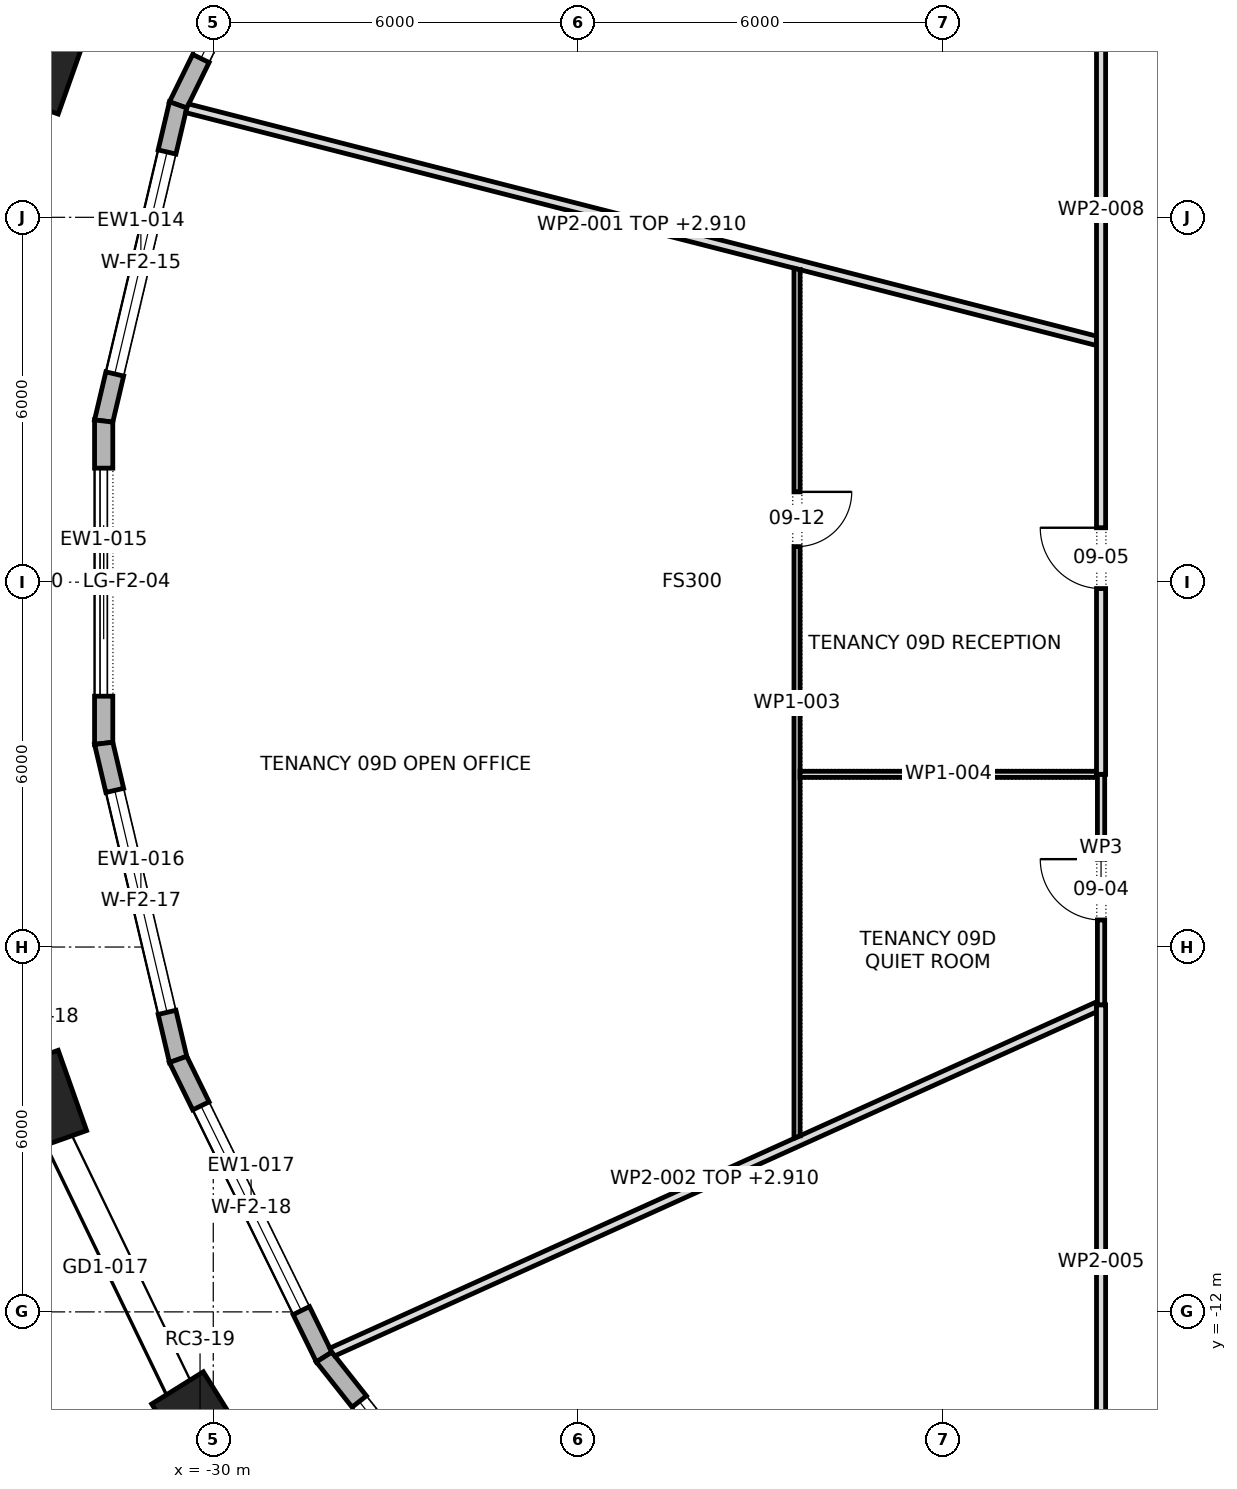
"""IFC4 building model, lengths in metres.
Left out: names, types, materials, properties, quantities, classifications, styles, units other than length and angle.
Written with IfcOpenShell. Run it as: python <this file> out.ifc"""

import sys

from ifc_helpers import new_model, si_unit, direction, frame, frame_2d, origin, origin_2d, place, context, subcontext, project, spatial, polyline, rectangle, outline, extrude, element, fill, save


model = new_model("IFC4")
c1 = context("Model", 3, precision=1e-05, world=origin(), true_north=direction((0.0, 1.0)))
c2 = subcontext(c1, "Body", "Model", "MODEL_VIEW")
j1 = project(units=[si_unit("LENGTHUNIT", "METRE"), si_unit("PLANEANGLEUNIT", "RADIAN")], contexts=[c1])
p1 = place(None, origin())
s1 = spatial("IfcSite", under=j1, at=p1, CompositionType="ELEMENT")
p2 = place(p1, origin())
s2 = spatial("IfcBuilding", under=s1, at=p2, CompositionType="ELEMENT")
p3 = place(p2, frame((0.0, 0.0, 138.1)))
s3 = spatial("IfcBuildingStorey", under=s2, at=p3, CompositionType="ELEMENT", Elevation=138.1)
for number, where, z_axis, x_axis in (
    (1, (-32.788, 8.525, 0.0), (0.0, 0.0, 1.0), (-0.334, -0.943, 0.0)),
    (2, (-32.788, -8.525, 0.0), (0.0, 0.0, 1.0), (0.334, -0.943, 0.0)),
    (3, (-30.217, -13.844, 0.0), (0.0, 0.0, 1.0), (0.529, -0.849, 0.0)),
):
    element("IfcColumn", number, at=place(p3, frame(where, z_axis=z_axis, x_axis=x_axis)), inside=s3, PredefinedType="COLUMN", context=c2, shape_type="SweptSolid", body=[
        extrude(rectangle(XDim=1.4, YDim=1.0, at=origin_2d()), origin(), (0.0, 0.0, 1.0), 4.2),
    ])
p4 = place(p3, frame((-28.177, 12.743, 0.0), z_axis=(0.0, 0.0, 1.0), x_axis=(-0.440321465864, -0.897840189956, 0.0)))
e4 = element("IfcWall", 4, at=p4, inside=s3, PredefinedType="STANDARD", context=c2, shape_type="SweptSolid", body=[
    extrude(outline(polyline([(-0.016, -0.15), (5.468, -0.15), (5.435, 0.15), (0.016, 0.15), (-0.016, -0.15)])), origin(), (0.0, 0.0, 1.0), 3.9),
])
p5 = place(p4, frame((0.851, 0.0, 0.6)))
e5 = element("IfcOpeningElement", 5, at=p5, cuts=e4, PredefinedType="OPENING", context=c2, shape_type="SweptSolid", body=[
    extrude(rectangle(XDim=3.75, YDim=2.85, at=frame_2d((1.875, 1.425))), frame((0.0, 0.162, 0.0), z_axis=(0.0, -1.0, 0.0), x_axis=(1.0, 0.0, 0.0)), (0.0, 0.0, 1.0), 0.324),
])
p6 = place(p3, frame((-30.578, 7.848, 0.0), z_axis=(0.0, 0.0, 1.0), x_axis=(-0.229227895667, -0.973372781543, 0.0)))
e6 = element("IfcWall", 6, at=p6, inside=s3, PredefinedType="STANDARD", context=c2, shape_type="SweptSolid", body=[
    extrude(outline(polyline([(-0.017, -0.15), (5.357, -0.15), (5.323, 0.15), (0.017, 0.15), (-0.017, -0.15)])), origin(), (0.0, 0.0, 1.0), 3.9),
])
p7 = place(p6, frame((0.795, 0.0, 0.6)))
e7 = element("IfcOpeningElement", 7, at=p7, cuts=e6, PredefinedType="OPENING", context=c2, shape_type="SweptSolid", body=[
    extrude(rectangle(XDim=3.75, YDim=2.85, at=frame_2d((1.875, 1.425))), frame((0.0, 0.162, 0.0), z_axis=(0.0, -1.0, 0.0), x_axis=(1.0, 0.0, 0.0)), (0.0, 0.0, 1.0), 0.324),
])
p8 = place(p3, frame((-31.802, 2.65, 0.0), z_axis=(0.0, 0.0, 1.0), x_axis=(0.0, -1.0, 0.0)))
e8 = element("IfcWall", 8, at=p8, inside=s3, PredefinedType="STANDARD", context=c2, shape_type="SweptSolid", body=[
    extrude(outline(polyline([(-0.017, -0.15), (5.318, -0.15), (5.283, 0.15), (0.017, 0.15), (-0.017, -0.15)])), origin(), (0.0, 0.0, 1.0), 3.9),
])
p9 = place(p8, frame((0.775, 0.0, 0.0)))
e9 = element("IfcOpeningElement", 9, at=p9, cuts=e8, PredefinedType="OPENING", context=c2, shape_type="SweptSolid", body=[
    extrude(rectangle(XDim=3.75, YDim=3.45, at=frame_2d((1.875, 1.725))), frame((0.0, 0.162, 0.0), z_axis=(0.0, -1.0, 0.0), x_axis=(1.0, 0.0, 0.0)), (0.0, 0.0, 1.0), 0.324),
])
p10 = place(p3, frame((-31.802, -2.65, 0.0), z_axis=(0.0, 0.0, 1.0), x_axis=(0.229227895667, -0.973372781543, 0.0)))
e10 = element("IfcWall", 10, at=p10, inside=s3, PredefinedType="STANDARD", context=c2, shape_type="SweptSolid", body=[
    extrude(outline(polyline([(-0.017, -0.15), (5.357, -0.15), (5.323, 0.15), (0.017, 0.15), (-0.017, -0.15)])), origin(), (0.0, 0.0, 1.0), 3.9),
])
p11 = place(p10, frame((0.795, 0.0, 0.6)))
e11 = element("IfcOpeningElement", 11, at=p11, cuts=e10, PredefinedType="OPENING", context=c2, shape_type="SweptSolid", body=[
    extrude(rectangle(XDim=3.75, YDim=2.85, at=frame_2d((1.875, 1.425))), frame((0.0, 0.162, 0.0), z_axis=(0.0, -1.0, 0.0), x_axis=(1.0, 0.0, 0.0)), (0.0, 0.0, 1.0), 0.324),
])
p12 = place(p3, frame((-30.578, -7.848, 0.0), z_axis=(0.0, 0.0, 1.0), x_axis=(0.440321465864, -0.897840189956, 0.0)))
e12 = element("IfcWall", 12, at=p12, inside=s3, PredefinedType="STANDARD", context=c2, shape_type="SweptSolid", body=[
    extrude(outline(polyline([(-0.017, -0.15), (5.468, -0.15), (5.435, 0.15), (0.017, 0.15), (-0.017, -0.15)])), origin(), (0.0, 0.0, 1.0), 3.9),
])
p13 = place(p12, frame((0.851, 0.0, 0.6)))
e13 = element("IfcOpeningElement", 13, at=p13, cuts=e12, PredefinedType="OPENING", context=c2, shape_type="SweptSolid", body=[
    extrude(rectangle(XDim=3.75, YDim=2.85, at=frame_2d((1.875, 1.425))), frame((0.0, 0.162, 0.0), z_axis=(0.0, -1.0, 0.0), x_axis=(1.0, 0.0, 0.0)), (0.0, 0.0, 1.0), 0.324),
])
p14 = place(p3, frame((-28.177, -12.743, 0.0), z_axis=(0.0, 0.0, 1.0), x_axis=(0.620464552431, -0.784234492468, 0.0)))
e14 = element("IfcWall", 14, at=p14, inside=s3, PredefinedType="STANDARD", context=c2, shape_type="SweptSolid", body=[
    extrude(outline(polyline([(-0.016, -0.15), (5.629, -0.15), (5.599, 0.15), (0.016, 0.15), (-0.016, -0.15)])), origin(), (0.0, 0.0, 1.0), 3.9),
])
p15 = place(p14, frame((0.932, 0.0, 0.6)))
e15 = element("IfcOpeningElement", 15, at=p15, cuts=e14, PredefinedType="OPENING", context=c2, shape_type="SweptSolid", body=[
    extrude(rectangle(XDim=3.75, YDim=2.85, at=frame_2d((1.875, 1.425))), frame((0.0, 0.162, 0.0), z_axis=(0.0, -1.0, 0.0), x_axis=(1.0, 0.0, 0.0)), (0.0, 0.0, 1.0), 0.324),
])
p16 = place(p3, frame((-30.435, 7.795, 0.0), z_axis=(0.0, 0.0, 1.0), x_axis=(0.968826155352, -0.247741560312, 0.0)))
e16 = element("IfcWall", 16, at=p16, inside=s3, PredefinedType="PARTITIONING", context=c2, shape_type="SweptSolid", body=[
    extrude(outline(polyline([(0.0, -0.075), (1.737, -0.075), (3.474, -0.075), (5.211, -0.075), (6.948, -0.075), (8.685, -0.075), (10.422, -0.075), (10.428, -0.073), (10.428, -0.075), (12.106, -0.075), (13.783, -0.075), (15.46, -0.075), (15.46, -0.073), (15.422, 0.075), (13.496, 0.075), (11.57, 0.075), (9.644, 0.075), (7.718, 0.075), (5.792, 0.075), (3.866, 0.075), (1.939, 0.075), (0.013, 0.075), (0.0, 0.01), (0.0, -0.075)])), origin(), (0.0, 0.0, 1.0), 2.91),
])
p17 = place(p3, frame((-28.052, -12.664, 0.0), z_axis=(0.0, 0.0, 1.0), x_axis=(0.911350334726, 0.411631591833, 0.0)))
e17 = element("IfcWall", 17, at=p17, inside=s3, PredefinedType="PARTITIONING", context=c2, shape_type="SweptSolid", body=[
    extrude(outline(polyline([(0.021, -0.075), (1.985, -0.075), (3.948, -0.075), (5.912, -0.075), (7.875, -0.075), (9.839, -0.075), (11.802, -0.075), (13.766, -0.075), (13.814, 0.031), (13.827, 0.025), (13.85, 0.074), (13.85, 0.075), (12.061, 0.075), (10.273, 0.075), (8.485, 0.075), (8.484, 0.073), (8.481, 0.075), (6.785, 0.075), (5.089, 0.075), (3.392, 0.075), (1.696, 0.075), (0.0, 0.075), (0.0, 0.074), (0.002, 0.001), (0.021, -0.075)])), origin(), (0.0, 0.0, 1.0), 2.91),
])
p18 = place(p3, frame((-20.4, -9.148, 0.0), z_axis=(0.0, 0.0, 1.0), x_axis=(0.0, 1.0, 0.0)))
e18 = element("IfcWall", 18, at=p18, inside=s3, PredefinedType="PARTITIONING", context=c2, shape_type="SweptSolid", body=[
    extrude(outline(polyline([(0.045, -0.05), (2.01, -0.05), (3.974, -0.05), (5.938, -0.05), (5.938, -0.05), (6.038, -0.05), (6.038, -0.05), (7.688, -0.05), (9.338, -0.05), (10.988, -0.05), (12.637, -0.05), (14.287, -0.05), (14.312, 0.049), (14.312, 0.05), (12.523, 0.05), (10.734, 0.05), (8.945, 0.05), (7.156, 0.05), (5.367, 0.05), (3.578, 0.05), (1.789, 0.05), (0.0, 0.05), (0.0, 0.05), (0.045, -0.05)])), origin(), (0.0, 0.0, 1.0), 3.9),
])
p19 = place(p18, frame((9.733, 0.0, 0.0)))
e19 = element("IfcOpeningElement", 19, at=p19, cuts=e18, PredefinedType="OPENING", context=c2, shape_type="SweptSolid", body=[
    extrude(rectangle(XDim=0.9, YDim=2.1, at=frame_2d((0.45, 1.05))), frame((0.0, 0.062, 0.0), z_axis=(0.0, -1.0, 0.0), x_axis=(1.0, 0.0, 0.0)), (0.0, 0.0, 1.0), 0.124),
])
p20 = place(p3, frame((-20.35, -3.16, 0.0), z_axis=(0.0, 0.0, 1.0), x_axis=(1.0, 0.0, 0.0)))
e20 = element("IfcWall", 20, at=p20, inside=s3, PredefinedType="PARTITIONING", context=c2, shape_type="SweptSolid", body=[
    extrude(outline(polyline([(4.89, -0.05), (4.89, 0.0), (4.875, 0.0), (4.875, 0.05), (3.25, 0.05), (1.625, 0.05), (0.0, 0.05), (0.0, -0.05), (1.63, -0.05), (3.26, -0.05), (4.89, -0.05)])), origin(), (0.0, 0.0, 1.0), 3.9),
])
p21 = place(p3, frame((-15.4, -15.475, 0.0), z_axis=(0.0, 0.0, 1.0), x_axis=(0.0, 1.0, 0.0)))
e21 = element("IfcWall", 21, at=p21, inside=s3, PredefinedType="PARTITIONING", context=c2, shape_type="SweptSolid", body=[
    extrude(outline(polyline([(8.525, 0.075), (6.82, 0.075), (5.115, 0.075), (3.41, 0.075), (1.705, 0.075), (0.0, 0.075), (0.15, -0.075), (1.825, -0.075), (3.5, -0.075), (5.175, -0.075), (6.85, -0.075), (8.525, -0.075), (8.525, 0.075)])), origin(), (0.0, 0.0, 1.0), 3.9),
])
p22 = place(p3, frame((-15.4, -6.95, 0.0), z_axis=(0.0, 0.0, 1.0), x_axis=(0.0, 1.0, 0.0)))
e22 = element("IfcWall", 22, at=p22, inside=s3, PredefinedType="PARTITIONING", context=c2, shape_type="SweptSolid", body=[
    extrude(rectangle(XDim=3.79, YDim=0.12, at=frame_2d((1.895, 0.0))), origin(), (0.0, 0.0, 1.0), 3.9),
])
p23 = place(p22, frame((1.395, 0.0, 0.0)))
e23 = element("IfcOpeningElement", 23, at=p23, cuts=e22, PredefinedType="OPENING", context=c2, shape_type="SweptSolid", body=[
    extrude(rectangle(XDim=1.0, YDim=2.1, at=frame_2d((0.5, 1.05))), frame((0.0, 0.072, 0.0), z_axis=(0.0, -1.0, 0.0), x_axis=(1.0, 0.0, 0.0)), (0.0, 0.0, 1.0), 0.144),
])
p24 = place(p3, frame((-15.4, -3.16, 0.0), z_axis=(0.0, 0.0, 1.0), x_axis=(0.0, 1.0, 0.0)))
e24 = element("IfcWall", 24, at=p24, inside=s3, PredefinedType="PARTITIONING", context=c2, shape_type="SweptSolid", body=[
    extrude(outline(polyline([(0.0, -0.075), (1.848, -0.075), (3.697, -0.075), (5.545, -0.075), (7.394, -0.075), (9.242, -0.075), (11.091, -0.075), (12.939, -0.075), (14.788, -0.075), (16.636, -0.075), (18.485, -0.075), (18.635, 0.075), (16.771, 0.075), (14.908, 0.075), (13.044, 0.075), (11.181, 0.075), (9.317, 0.075), (7.454, 0.075), (5.59, 0.075), (3.727, 0.075), (1.864, 0.075), (0.0, 0.075), (0.0, -0.075)])), origin(), (0.0, 0.0, 1.0), 3.9),
])
p25 = place(p24, frame((11.935, 0.0, 0.0)))
e25 = element("IfcOpeningElement", 25, at=p25, cuts=e24, PredefinedType="OPENING", context=c2, shape_type="SweptSolid", body=[
    extrude(rectangle(XDim=1.8, YDim=2.1, at=frame_2d((0.9, 1.05))), frame((0.0, 0.087, 0.0), z_axis=(0.0, -1.0, 0.0), x_axis=(1.0, 0.0, 0.0)), (0.0, 0.0, 1.0), 0.174),
])
p26 = place(p24, frame((3.055, 0.0, 0.0)))
e26 = element("IfcOpeningElement", 26, at=p26, cuts=e24, PredefinedType="OPENING", context=c2, shape_type="SweptSolid", body=[
    extrude(rectangle(XDim=1.0, YDim=2.1, at=frame_2d((0.5, 1.05))), frame((0.0, 0.087, 0.0), z_axis=(0.0, -1.0, 0.0), x_axis=(1.0, 0.0, 0.0)), (0.0, 0.0, 1.0), 0.174),
])
p27 = place(p5, origin())
e27 = element("IfcWindow", 27, at=p27, inside=s3, PartitioningType="TRIPLE_PANEL_VERTICAL", PredefinedType="WINDOW", context=c2, shape_type="SweptSolid", body=[
    extrude(rectangle(XDim=3.75, YDim=2.85, at=frame_2d((1.875, 1.425))), frame((0.0, 0.03, 0.0), z_axis=(0.0, -1.0, 0.0), x_axis=(1.0, 0.0, 0.0)), (0.0, 0.0, 1.0), 0.06),
])
fill(e5, e27)
p28 = place(p7, origin())
e28 = element("IfcWindow", 28, at=p28, inside=s3, PartitioningType="TRIPLE_PANEL_VERTICAL", PredefinedType="WINDOW", context=c2, shape_type="SweptSolid", body=[
    extrude(rectangle(XDim=3.75, YDim=2.85, at=frame_2d((1.875, 1.425))), frame((0.0, 0.03, 0.0), z_axis=(0.0, -1.0, 0.0), x_axis=(1.0, 0.0, 0.0)), (0.0, 0.0, 1.0), 0.06),
])
fill(e7, e28)
p29 = place(p9, origin())
e29 = element("IfcDoor", 29, at=p29, inside=s3, OperationType="DOUBLE_DOOR_SLIDING", PredefinedType="DOOR", context=c2, shape_type="SweptSolid", body=[
    extrude(rectangle(XDim=3.75, YDim=3.45, at=frame_2d((1.875, 1.725))), frame((0.0, 0.025, 0.0), z_axis=(0.0, -1.0, 0.0), x_axis=(1.0, 0.0, 0.0)), (0.0, 0.0, 1.0), 0.05),
])
fill(e9, e29)
p30 = place(p11, origin())
e30 = element("IfcWindow", 30, at=p30, inside=s3, PartitioningType="TRIPLE_PANEL_VERTICAL", PredefinedType="WINDOW", context=c2, shape_type="SweptSolid", body=[
    extrude(rectangle(XDim=3.75, YDim=2.85, at=frame_2d((1.875, 1.425))), frame((0.0, 0.03, 0.0), z_axis=(0.0, -1.0, 0.0), x_axis=(1.0, 0.0, 0.0)), (0.0, 0.0, 1.0), 0.06),
])
fill(e11, e30)
p31 = place(p13, origin())
e31 = element("IfcWindow", 31, at=p31, inside=s3, PartitioningType="TRIPLE_PANEL_VERTICAL", PredefinedType="WINDOW", context=c2, shape_type="SweptSolid", body=[
    extrude(rectangle(XDim=3.75, YDim=2.85, at=frame_2d((1.875, 1.425))), frame((0.0, 0.03, 0.0), z_axis=(0.0, -1.0, 0.0), x_axis=(1.0, 0.0, 0.0)), (0.0, 0.0, 1.0), 0.06),
])
fill(e13, e31)
p32 = place(p15, origin())
e32 = element("IfcWindow", 32, at=p32, inside=s3, PartitioningType="TRIPLE_PANEL_VERTICAL", PredefinedType="WINDOW", context=c2, shape_type="SweptSolid", body=[
    extrude(rectangle(XDim=3.75, YDim=2.85, at=frame_2d((1.875, 1.425))), frame((0.0, 0.03, 0.0), z_axis=(0.0, -1.0, 0.0), x_axis=(1.0, 0.0, 0.0)), (0.0, 0.0, 1.0), 0.06),
])
fill(e15, e32)
p33 = place(p23, origin())
e33 = element("IfcDoor", 33, at=p33, inside=s3, OperationType="SINGLE_SWING_LEFT", PredefinedType="DOOR", context=c2, shape_type="SweptSolid", body=[
    extrude(rectangle(XDim=1.0, YDim=2.1, at=frame_2d((0.5, 1.05))), frame((0.0, 0.025, 0.0), z_axis=(0.0, -1.0, 0.0), x_axis=(1.0, 0.0, 0.0)), (0.0, 0.0, 1.0), 0.05),
])
fill(e23, e33)
p34 = place(p26, origin())
e34 = element("IfcDoor", 34, at=p34, inside=s3, OperationType="SINGLE_SWING_LEFT", PredefinedType="DOOR", context=c2, shape_type="SweptSolid", body=[
    extrude(rectangle(XDim=1.0, YDim=2.1, at=frame_2d((0.5, 1.05))), frame((0.0, 0.025, 0.0), z_axis=(0.0, -1.0, 0.0), x_axis=(1.0, 0.0, 0.0)), (0.0, 0.0, 1.0), 0.05),
])
fill(e26, e34)
p35 = place(p19, frame((0.9, 0.0, 0.0), z_axis=(0.0, 0.0, 1.0), x_axis=(-1.0, 0.0, 0.0)))
e35 = element("IfcDoor", 35, at=p35, inside=s3, OperationType="SINGLE_SWING_RIGHT", PredefinedType="DOOR", context=c2, shape_type="SweptSolid", body=[
    extrude(rectangle(XDim=0.9, YDim=2.1, at=frame_2d((0.45, 1.05))), frame((0.0, 0.025, 0.0), z_axis=(0.0, -1.0, 0.0), x_axis=(1.0, 0.0, 0.0)), (0.0, 0.0, 1.0), 0.05),
])
fill(e19, e35)
save(model, sys.argv[1])
